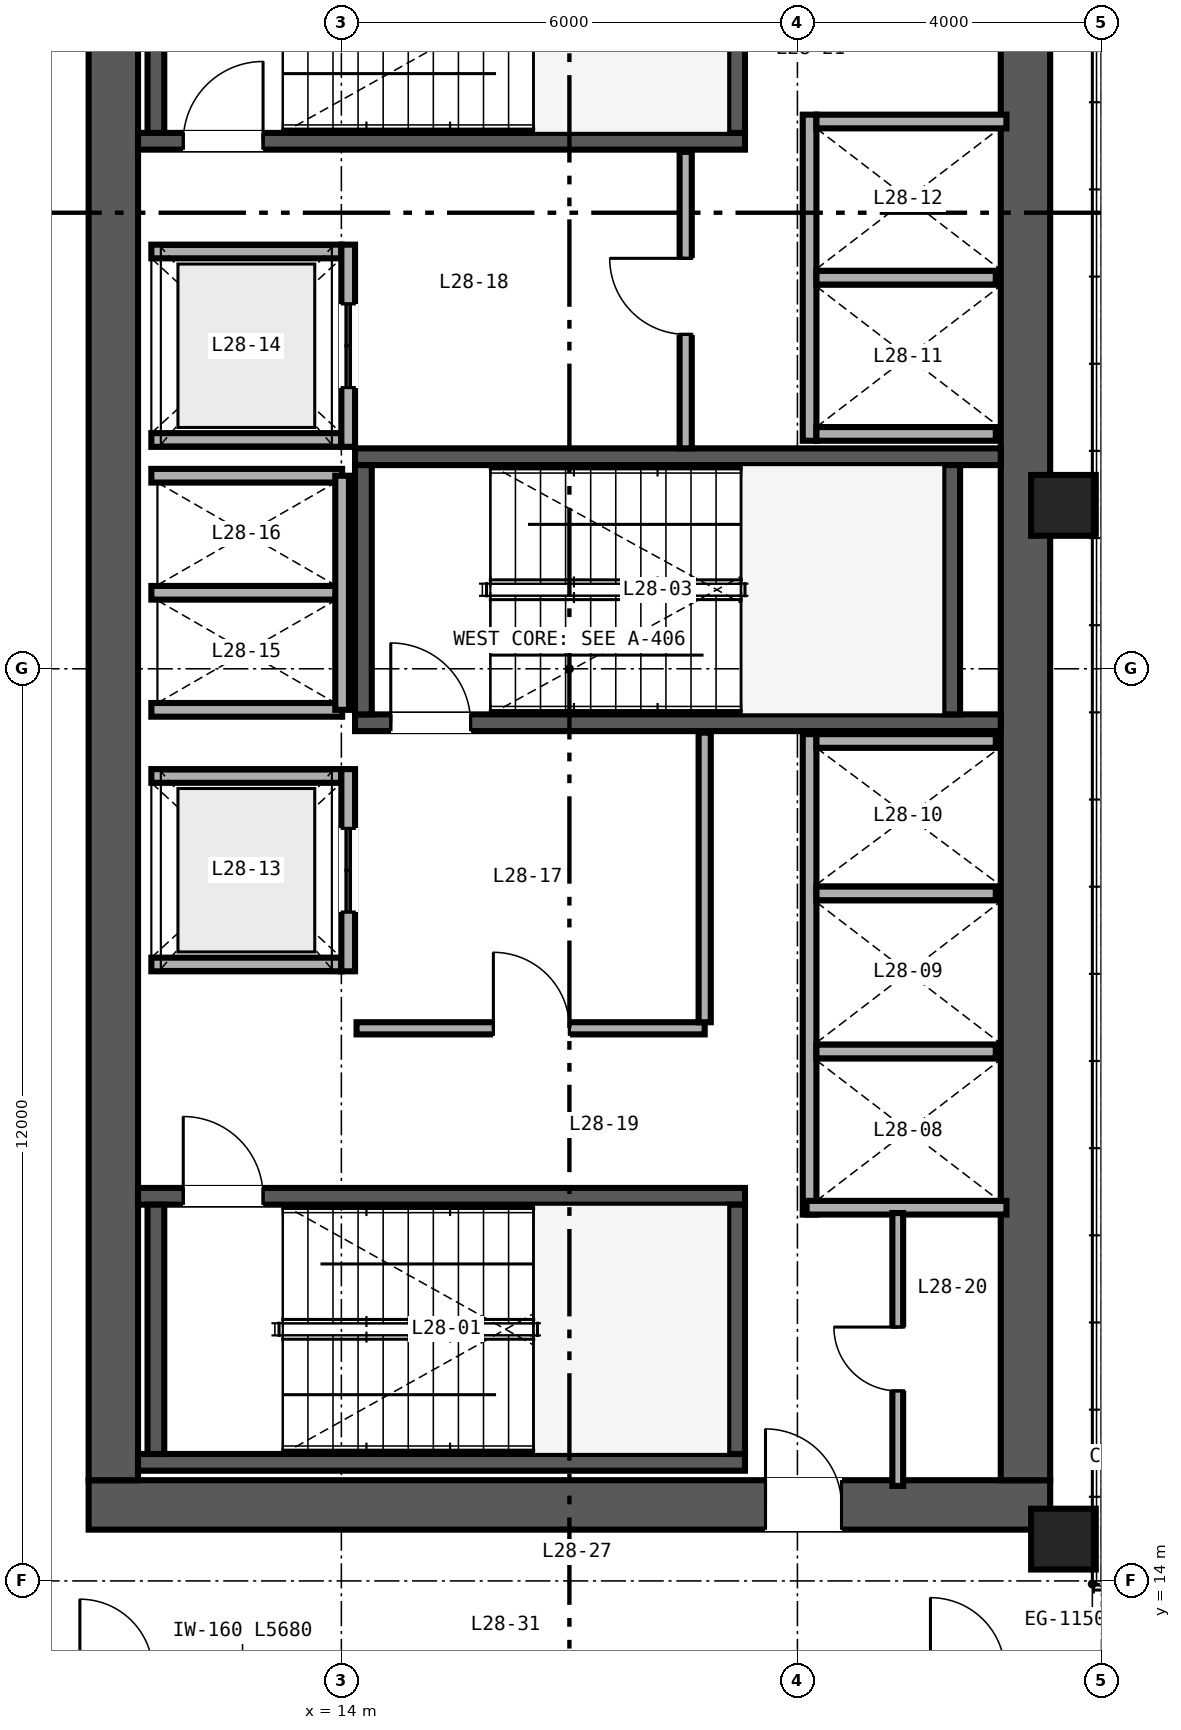
"""IFC4 building model, lengths in metres.
Left out: names, types, materials, properties, quantities, classifications, styles, units other than length and angle.
Written with IfcOpenShell. Run it as: python <this file> out.ifc"""

import sys

from ifc_helpers import new_model, si_unit, direction, frame, frame_2d, origin, origin_2d, place, context, subcontext, project, spatial, rectangle, hollow_rectangle, extrude, source, transform, mapped, element, fill, save


model = new_model("IFC4")
c1 = context("Model", 3, precision=1e-05, world=origin(), true_north=direction((0.0, 1.0)))
c2 = subcontext(c1, "Body", "Model", "MODEL_VIEW")
j1 = project(units=[si_unit("LENGTHUNIT", "METRE"), si_unit("PLANEANGLEUNIT", "RADIAN")], contexts=[c1])
p1 = place(None, origin())
s1 = spatial("IfcSite", under=j1, at=p1, CompositionType="ELEMENT")
p2 = place(p1, origin())
s2 = spatial("IfcBuilding", under=s1, at=p2, CompositionType="ELEMENT")
p3 = place(p2, frame((0.0, 0.0, 115.2)))
s3 = spatial("IfcBuildingStorey", under=s2, at=p3, CompositionType="ELEMENT", Elevation=115.2)
p4 = place(p3, frame((10.675, 15.0, 0.0), z_axis=(0.0, 0.0, 1.0), x_axis=(1.0, 0.0, 0.0)))
e1 = element("IfcWall", 1, at=p4, inside=s3, PredefinedType="SHEAR", context=c2, shape_type="SweptSolid", body=[
    extrude(rectangle(XDim=12.65, YDim=0.65, at=frame_2d((6.325, 0.0))), origin(), (0.0, 0.0, 1.0), 3.36),
])
p5 = place(p4, frame((8.905, 0.0, 0.0)))
e2 = element("IfcOpeningElement", 2, at=p5, cuts=e1, PredefinedType="OPENING", context=c2, shape_type="SweptSolid", body=[
    extrude(rectangle(XDim=1.0, YDim=2.15, at=frame_2d((0.5, 1.075))), frame((0.0, 0.335, 0.0), z_axis=(0.0, -1.0, 0.0), x_axis=(1.0, 0.0, 0.0)), (0.0, 0.0, 1.0), 0.67),
])
for number, where, z_axis, x_axis in (
    (3, (11.0, 15.325, 0.0), (0.0, 0.0, 1.0), (0.0, 1.0, 0.0)),
    (4, (23.0, 15.325, 0.0), (0.0, 0.0, 1.0), (0.0, 1.0, 0.0)),
):
    element("IfcWall", number, at=place(p3, frame(where, z_axis=z_axis, x_axis=x_axis)), inside=s3, PredefinedType="SHEAR", context=c2, shape_type="SweptSolid", body=[
        extrude(rectangle(XDim=21.35, YDim=0.65, at=frame_2d((10.675, 0.0))), origin(), (0.0, 0.0, 1.0), 3.36),
    ])
p6 = place(p3, frame((11.325, 15.56, 0.0), z_axis=(0.0, 0.0, 1.0), x_axis=(1.0, 0.0, 0.0)))
e5 = element("IfcWall", 5, at=p6, inside=s3, PredefinedType="SHEAR", context=c2, shape_type="SweptSolid", body=[
    extrude(rectangle(XDim=7.985, YDim=0.22, at=frame_2d((3.993, 0.0))), origin(), (0.0, 0.0, 1.0), 3.4),
])
p7 = place(p3, frame((11.325, 19.06, 0.0), z_axis=(0.0, 0.0, 1.0), x_axis=(1.0, 0.0, 0.0)))
e6 = element("IfcWall", 6, at=p7, inside=s3, PredefinedType="SHEAR", context=c2, shape_type="SweptSolid", body=[
    extrude(rectangle(XDim=7.985, YDim=0.22, at=frame_2d((3.993, 0.0))), origin(), (0.0, 0.0, 1.0), 3.4),
])
p8 = place(p7, frame((0.595, 0.0, 0.0)))
e7 = element("IfcOpeningElement", 7, at=p8, cuts=e6, PredefinedType="OPENING", context=c2, shape_type="SweptSolid", body=[
    extrude(rectangle(XDim=1.05, YDim=2.15, at=frame_2d((0.525, 1.075))), frame((0.0, 0.12, 0.0), z_axis=(0.0, -1.0, 0.0), x_axis=(1.0, 0.0, 0.0)), (0.0, 0.0, 1.0), 0.24),
])
for number, where, z_axis, x_axis in (
    (8, (11.56, 15.67, 0.0), (0.0, 0.0, 1.0), (0.0, 1.0, 0.0)),
    (9, (19.2, 15.67, 0.0), (0.0, 0.0, 1.0), (0.0, 1.0, 0.0)),
):
    element("IfcWall", number, at=place(p3, frame(where, z_axis=z_axis, x_axis=x_axis)), inside=s3, PredefinedType="SHEAR", context=c2, shape_type="SweptSolid", body=[
        extrude(rectangle(XDim=3.28, YDim=0.22, at=frame_2d((1.64, 0.0))), origin(), (0.0, 0.0, 1.0), 3.4),
    ])
p9 = place(p3, frame((11.325, 32.94, 0.0), z_axis=(0.0, 0.0, 1.0), x_axis=(1.0, 0.0, 0.0)))
e10 = element("IfcWall", 10, at=p9, inside=s3, PredefinedType="SHEAR", context=c2, shape_type="SweptSolid", body=[
    extrude(rectangle(XDim=7.985, YDim=0.22, at=frame_2d((3.993, 0.0))), origin(), (0.0, 0.0, 1.0), 3.4),
])
p10 = place(p9, frame((0.595, 0.0, 0.0)))
e11 = element("IfcOpeningElement", 11, at=p10, cuts=e10, PredefinedType="OPENING", context=c2, shape_type="SweptSolid", body=[
    extrude(rectangle(XDim=1.05, YDim=2.15, at=frame_2d((0.525, 1.075))), frame((0.0, 0.12, 0.0), z_axis=(0.0, -1.0, 0.0), x_axis=(1.0, 0.0, 0.0)), (0.0, 0.0, 1.0), 0.24),
])
for number, where, z_axis, x_axis in (
    (12, (11.56, 33.05, 0.0), (0.0, 0.0, 1.0), (0.0, 1.0, 0.0)),
    (13, (19.2, 33.05, 0.0), (0.0, 0.0, 1.0), (0.0, 1.0, 0.0)),
):
    element("IfcWall", number, at=place(p3, frame(where, z_axis=z_axis, x_axis=x_axis)), inside=s3, PredefinedType="SHEAR", context=c2, shape_type="SweptSolid", body=[
        extrude(rectangle(XDim=3.28, YDim=0.22, at=frame_2d((1.64, 0.0))), origin(), (0.0, 0.0, 1.0), 3.4),
    ])
p11 = place(p3, frame((14.18, 25.29, 0.0), z_axis=(0.0, 0.0, 1.0), x_axis=(1.0, 0.0, 0.0)))
e14 = element("IfcWall", 14, at=p11, inside=s3, PredefinedType="SHEAR", context=c2, shape_type="SweptSolid", body=[
    extrude(rectangle(XDim=8.495, YDim=0.22, at=frame_2d((4.248, 0.0))), origin(), (0.0, 0.0, 1.0), 3.4),
])
p12 = place(p11, frame((0.47, 0.0, 0.0)))
e15 = element("IfcOpeningElement", 15, at=p12, cuts=e14, PredefinedType="OPENING", context=c2, shape_type="SweptSolid", body=[
    extrude(rectangle(XDim=1.05, YDim=2.15, at=frame_2d((0.525, 1.075))), frame((0.0, 0.12, 0.0), z_axis=(0.0, -1.0, 0.0), x_axis=(1.0, 0.0, 0.0)), (0.0, 0.0, 1.0), 0.24),
])
p13 = place(p3, frame((14.18, 28.79, 0.0), z_axis=(0.0, 0.0, 1.0), x_axis=(1.0, 0.0, 0.0)))
e16 = element("IfcWall", 16, at=p13, inside=s3, PredefinedType="SHEAR", context=c2, shape_type="SweptSolid", body=[
    extrude(rectangle(XDim=8.495, YDim=0.22, at=frame_2d((4.248, 0.0))), origin(), (0.0, 0.0, 1.0), 3.4),
])
for number, where, z_axis, x_axis in (
    (17, (14.29, 25.4, 0.0), (0.0, 0.0, 1.0), (0.0, 1.0, 0.0)),
    (18, (22.03, 25.4, 0.0), (0.0, 0.0, 1.0), (0.0, 1.0, 0.0)),
):
    element("IfcWall", number, at=place(p3, frame(where, z_axis=z_axis, x_axis=x_axis)), inside=s3, PredefinedType="SHEAR", context=c2, shape_type="SweptSolid", body=[
        extrude(rectangle(XDim=3.28, YDim=0.22, at=frame_2d((1.64, 0.0))), origin(), (0.0, 0.0, 1.0), 3.4),
    ])
m1 = source(origin(), c2, "Body", "SweptSolid", [
    extrude(hollow_rectangle(XDim=0.85, YDim=0.8, WallThickness=0.032, at=origin_2d()), origin(), (0.0, 0.0, 1.0), 3.36),
])
for number, where, z_axis, x_axis in (
    (19, (23.5, 14.55, 0.0), (0.0, 0.0, 1.0), (1.0, 0.0, 0.0)),
    (20, (23.5, 28.15, 0.0), (0.0, 0.0, 1.0), (1.0, 0.0, 0.0)),
):
    element("IfcColumn", number, at=place(p3, frame(where, z_axis=z_axis, x_axis=x_axis)), inside=s3, PredefinedType="COLUMN", context=c2, shape_type="MappedRepresentation", body=[
        mapped(m1, transform((0.0, 0.0, 0.0), scale=1.0)),
    ])
p14 = place(p3, frame((20.16, 18.82, 0.0), z_axis=(0.0, 0.0, 1.0), x_axis=(0.0, 1.0, 0.0)))
e21 = element("IfcWall", 21, at=p14, inside=s3, PredefinedType="SOLIDWALL", context=c2, shape_type="SweptSolid", body=[
    extrude(rectangle(XDim=6.32, YDim=0.18, at=frame_2d((3.16, 0.0))), origin(), (0.0, 0.0, 1.0), 2.36),
])
p15 = place(p3, frame((20.12, 18.91, 0.0), z_axis=(0.0, 0.0, 1.0), x_axis=(1.0, 0.0, 0.0)))
e22 = element("IfcWall", 22, at=p15, inside=s3, PredefinedType="SOLIDWALL", context=c2, shape_type="SweptSolid", body=[
    extrude(rectangle(XDim=2.63, YDim=0.18, at=frame_2d((1.315, 0.0))), origin(), (0.0, 0.0, 1.0), 3.36),
])
p16 = place(p3, frame((20.25, 25.05, 0.0), z_axis=(0.0, 0.0, 1.0), x_axis=(1.0, 0.0, 0.0)))
e23 = element("IfcWall", 23, at=p16, inside=s3, PredefinedType="SOLIDWALL", context=c2, shape_type="SweptSolid", body=[
    extrude(rectangle(XDim=2.36, YDim=0.18, at=frame_2d((1.18, 0.0))), origin(), (0.0, 0.0, 1.0), 3.36),
])
p17 = place(p3, frame((20.25, 20.965, 0.0), z_axis=(0.0, 0.0, 1.0), x_axis=(1.0, 0.0, 0.0)))
e24 = element("IfcWall", 24, at=p17, inside=s3, PredefinedType="SOLIDWALL", context=c2, shape_type="SweptSolid", body=[
    extrude(rectangle(XDim=2.36, YDim=0.18, at=frame_2d((1.18, 0.0))), origin(), (0.0, 0.0, 1.0), 2.36),
])
p18 = place(p3, frame((20.25, 23.045, 0.0), z_axis=(0.0, 0.0, 1.0), x_axis=(1.0, 0.0, 0.0)))
e25 = element("IfcWall", 25, at=p18, inside=s3, PredefinedType="SOLIDWALL", context=c2, shape_type="SweptSolid", body=[
    extrude(rectangle(XDim=2.36, YDim=0.18, at=frame_2d((1.18, 0.0))), origin(), (0.0, 0.0, 1.0), 3.36),
])
p19 = place(p3, frame((20.16, 29.0, 0.0), z_axis=(0.0, 0.0, 1.0), x_axis=(0.0, 1.0, 0.0)))
e26 = element("IfcWall", 26, at=p19, inside=s3, PredefinedType="SOLIDWALL", context=c2, shape_type="SweptSolid", body=[
    extrude(rectangle(XDim=4.29, YDim=0.18, at=frame_2d((2.145, 0.0))), origin(), (0.0, 0.0, 1.0), 3.36),
])
p20 = place(p3, frame((20.25, 29.09, 0.0), z_axis=(0.0, 0.0, 1.0), x_axis=(1.0, 0.0, 0.0)))
e27 = element("IfcWall", 27, at=p20, inside=s3, PredefinedType="SOLIDWALL", context=c2, shape_type="SweptSolid", body=[
    extrude(rectangle(XDim=2.36, YDim=0.18, at=frame_2d((1.18, 0.0))), origin(), (0.0, 0.0, 1.0), 3.36),
])
p21 = place(p3, frame((20.25, 33.2, 0.0), z_axis=(0.0, 0.0, 1.0), x_axis=(1.0, 0.0, 0.0)))
e28 = element("IfcWall", 28, at=p21, inside=s3, PredefinedType="SOLIDWALL", context=c2, shape_type="SweptSolid", body=[
    extrude(rectangle(XDim=2.5, YDim=0.18, at=frame_2d((1.25, 0.0))), origin(), (0.0, 0.0, 1.0), 3.36),
])
p22 = place(p3, frame((20.25, 31.145, 0.0), z_axis=(0.0, 0.0, 1.0), x_axis=(1.0, 0.0, 0.0)))
e29 = element("IfcWall", 29, at=p22, inside=s3, PredefinedType="SOLIDWALL", context=c2, shape_type="SweptSolid", body=[
    extrude(rectangle(XDim=2.36, YDim=0.18, at=frame_2d((1.18, 0.0))), origin(), (0.0, 0.0, 1.0), 3.36),
])
for number, where, z_axis, x_axis in (
    (30, (11.5, 22.11, 0.0), (0.0, 0.0, 1.0), (1.0, 0.0, 0.0)),
    (31, (11.5, 24.59, 0.0), (0.0, 0.0, 1.0), (1.0, 0.0, 0.0)),
):
    element("IfcWall", number, at=place(p3, frame(where, z_axis=z_axis, x_axis=x_axis)), inside=s3, PredefinedType="SOLIDWALL", context=c2, shape_type="SweptSolid", body=[
        extrude(rectangle(XDim=2.5, YDim=0.18, at=frame_2d((1.25, 0.0))), origin(), (0.0, 0.0, 1.0), 3.36),
    ])
p23 = place(p3, frame((14.09, 22.02, 0.0), z_axis=(0.0, 0.0, 1.0), x_axis=(0.0, 1.0, 0.0)))
e32 = element("IfcWall", 32, at=p23, inside=s3, PredefinedType="SOLIDWALL", context=c2, shape_type="SweptSolid", body=[
    extrude(rectangle(XDim=2.66, YDim=0.18, at=frame_2d((1.33, 0.0))), origin(), (0.0, 0.0, 1.0), 3.36),
])
p24 = place(p23, frame((0.78, 0.0, 0.0)))
e33 = element("IfcOpeningElement", 33, at=p24, cuts=e32, PredefinedType="OPENING", context=c2, shape_type="SweptSolid", body=[
    extrude(rectangle(XDim=1.1, YDim=2.2, at=frame_2d((0.55, 1.1))), frame((0.0, 0.1, 0.0), z_axis=(0.0, -1.0, 0.0), x_axis=(1.0, 0.0, 0.0)), (0.0, 0.0, 1.0), 0.2),
])
for number, where, z_axis, x_axis in (
    (34, (11.5, 29.01, 0.0), (0.0, 0.0, 1.0), (1.0, 0.0, 0.0)),
    (35, (11.5, 31.49, 0.0), (0.0, 0.0, 1.0), (1.0, 0.0, 0.0)),
):
    element("IfcWall", number, at=place(p3, frame(where, z_axis=z_axis, x_axis=x_axis)), inside=s3, PredefinedType="SOLIDWALL", context=c2, shape_type="SweptSolid", body=[
        extrude(rectangle(XDim=2.5, YDim=0.18, at=frame_2d((1.25, 0.0))), origin(), (0.0, 0.0, 1.0), 3.36),
    ])
p25 = place(p3, frame((14.09, 28.92, 0.0), z_axis=(0.0, 0.0, 1.0), x_axis=(0.0, 1.0, 0.0)))
e36 = element("IfcWall", 36, at=p25, inside=s3, PredefinedType="SOLIDWALL", context=c2, shape_type="SweptSolid", body=[
    extrude(rectangle(XDim=2.66, YDim=0.18, at=frame_2d((1.33, 0.0))), origin(), (0.0, 0.0, 1.0), 3.36),
])
p26 = place(p25, frame((0.78, 0.0, 0.0)))
e37 = element("IfcOpeningElement", 37, at=p26, cuts=e36, PredefinedType="OPENING", context=c2, shape_type="SweptSolid", body=[
    extrude(rectangle(XDim=1.1, YDim=2.2, at=frame_2d((0.55, 1.1))), frame((0.0, 0.1, 0.0), z_axis=(0.0, -1.0, 0.0), x_axis=(1.0, 0.0, 0.0)), (0.0, 0.0, 1.0), 0.2),
])
for number, where, z_axis, x_axis in (
    (38, (11.5, 25.46, 0.0), (0.0, 0.0, 1.0), (1.0, 0.0, 0.0)),
    (39, (11.5, 27.0, 0.0), (0.0, 0.0, 1.0), (1.0, 0.0, 0.0)),
    (40, (11.5, 28.54, 0.0), (0.0, 0.0, 1.0), (1.0, 0.0, 0.0)),
):
    element("IfcWall", number, at=place(p3, frame(where, z_axis=z_axis, x_axis=x_axis)), inside=s3, PredefinedType="SOLIDWALL", context=c2, shape_type="SweptSolid", body=[
        extrude(rectangle(XDim=2.51, YDim=0.18, at=frame_2d((1.255, 0.0))), origin(), (0.0, 0.0, 1.0), 3.36),
    ])
p27 = place(p3, frame((14.01, 25.46, 0.0), z_axis=(0.0, 0.0, 1.0), x_axis=(0.0, 1.0, 0.0)))
e41 = element("IfcWall", 41, at=p27, inside=s3, PredefinedType="SOLIDWALL", context=c2, shape_type="SweptSolid", body=[
    extrude(rectangle(XDim=3.08, YDim=0.18, at=frame_2d((1.54, 0.0))), origin(), (0.0, 0.0, 1.0), 3.36),
])
p28 = place(p3, frame((14.2, 21.27, 0.0), z_axis=(0.0, 0.0, 1.0), x_axis=(1.0, 0.0, 0.0)))
e42 = element("IfcWall", 42, at=p28, inside=s3, PredefinedType="PARTITIONING", context=c2, shape_type="SweptSolid", body=[
    extrude(rectangle(XDim=4.58, YDim=0.16, at=frame_2d((2.29, 0.0))), origin(), (0.0, 0.0, 1.0), 3.36),
])
p29 = place(p28, frame((1.8, 0.0, 0.0)))
e43 = element("IfcOpeningElement", 43, at=p29, cuts=e42, PredefinedType="OPENING", context=c2, shape_type="SweptSolid", body=[
    extrude(rectangle(XDim=1.0, YDim=2.15, at=frame_2d((0.5, 1.075))), frame((0.0, 0.09, 0.0), z_axis=(0.0, -1.0, 0.0), x_axis=(1.0, 0.0, 0.0)), (0.0, 0.0, 1.0), 0.18),
])
p30 = place(p3, frame((18.78, 21.35, 0.0), z_axis=(0.0, 0.0, 1.0), x_axis=(0.0, 1.0, 0.0)))
e44 = element("IfcWall", 44, at=p30, inside=s3, PredefinedType="PARTITIONING", context=c2, shape_type="SweptSolid", body=[
    extrude(rectangle(XDim=3.81, YDim=0.16, at=frame_2d((1.905, 0.0))), origin(), (0.0, 0.0, 1.0), 3.36),
])
p31 = place(p3, frame((18.53, 28.9, 0.0), z_axis=(0.0, 0.0, 1.0), x_axis=(0.0, 1.0, 0.0)))
e45 = element("IfcWall", 45, at=p31, inside=s3, PredefinedType="PARTITIONING", context=c2, shape_type="SweptSolid", body=[
    extrude(rectangle(XDim=3.9, YDim=0.16, at=frame_2d((1.95, 0.0))), origin(), (0.0, 0.0, 1.0), 3.36),
])
p32 = place(p31, frame((1.5, 0.0, 0.0)))
e46 = element("IfcOpeningElement", 46, at=p32, cuts=e45, PredefinedType="OPENING", context=c2, shape_type="SweptSolid", body=[
    extrude(rectangle(XDim=1.0, YDim=2.15, at=frame_2d((0.5, 1.075))), frame((0.0, 0.09, 0.0), z_axis=(0.0, -1.0, 0.0), x_axis=(1.0, 0.0, 0.0)), (0.0, 0.0, 1.0), 0.18),
])
p33 = place(p3, frame((21.32, 15.25, 0.0), z_axis=(0.0, 0.0, 1.0), x_axis=(0.0, 1.0, 0.0)))
e47 = element("IfcWall", 47, at=p33, inside=s3, PredefinedType="PARTITIONING", context=c2, shape_type="SweptSolid", body=[
    extrude(rectangle(XDim=3.59, YDim=0.142, at=frame_2d((1.795, 0.0))), origin(), (0.0, 0.0, 1.0), 3.36),
])
p34 = place(p33, frame((1.25, 0.0, 0.0)))
e48 = element("IfcOpeningElement", 48, at=p34, cuts=e47, PredefinedType="OPENING", context=c2, shape_type="SweptSolid", body=[
    extrude(rectangle(XDim=0.84, YDim=2.1, at=frame_2d((0.42, 1.05))), frame((0.0, 0.081, 0.0), z_axis=(0.0, -1.0, 0.0), x_axis=(1.0, 0.0, 0.0)), (0.0, 0.0, 1.0), 0.162),
])
m2 = source(origin(), c2, "Body", "SweptSolid", [
    extrude(rectangle(XDim=1.05, YDim=2.15, at=frame_2d((0.525, 1.075))), frame((0.0, 0.025, 0.0), z_axis=(0.0, -1.0, 0.0), x_axis=(1.0, 0.0, 0.0)), (0.0, 0.0, 1.0), 0.05),
])
p35 = place(p8, origin())
e49 = element("IfcDoor", 49, at=p35, inside=s3, OperationType="SINGLE_SWING_LEFT", PredefinedType="DOOR", context=c2, shape_type="MappedRepresentation", body=[
    mapped(m2, transform((0.0, 0.0, 0.0), scale=1.0)),
])
fill(e7, e49)
p36 = place(p10, origin())
e50 = element("IfcDoor", 50, at=p36, inside=s3, OperationType="SINGLE_SWING_RIGHT", PredefinedType="DOOR", context=c2, shape_type="MappedRepresentation", body=[
    mapped(m2, transform((0.0, 0.0, 0.0), scale=1.0)),
])
fill(e11, e50)
p37 = place(p12, origin())
e51 = element("IfcDoor", 51, at=p37, inside=s3, OperationType="SINGLE_SWING_LEFT", PredefinedType="DOOR", context=c2, shape_type="MappedRepresentation", body=[
    mapped(m2, transform((0.0, 0.0, 0.0), scale=1.0)),
])
fill(e15, e51)
m3 = source(origin(), c2, "Body", "SweptSolid", [
    extrude(rectangle(XDim=1.1, YDim=2.2, at=frame_2d((0.55, 1.1))), frame((0.0, 0.025, 0.0), z_axis=(0.0, -1.0, 0.0), x_axis=(1.0, 0.0, 0.0)), (0.0, 0.0, 1.0), 0.05),
])
p38 = place(p24, origin())
e52 = element("IfcDoor", 52, at=p38, inside=s3, OperationType="DOUBLE_DOOR_SLIDING", PredefinedType="DOOR", context=c2, shape_type="MappedRepresentation", body=[
    mapped(m3, transform((0.0, 0.0, 0.0), scale=1.0)),
])
fill(e33, e52)
p39 = place(p26, origin())
e53 = element("IfcDoor", 53, at=p39, inside=s3, OperationType="DOUBLE_DOOR_SLIDING", PredefinedType="DOOR", context=c2, shape_type="MappedRepresentation", body=[
    mapped(m3, transform((0.0, 0.0, 0.0), scale=1.0)),
])
fill(e37, e53)
m4 = source(origin(), c2, "Body", "SweptSolid", [
    extrude(rectangle(XDim=1.0, YDim=2.15, at=frame_2d((0.5, 1.075))), frame((0.0, 0.025, 0.0), z_axis=(0.0, -1.0, 0.0), x_axis=(1.0, 0.0, 0.0)), (0.0, 0.0, 1.0), 0.05),
])
p40 = place(p29, origin())
e54 = element("IfcDoor", 54, at=p40, inside=s3, OperationType="SINGLE_SWING_LEFT", PredefinedType="DOOR", context=c2, shape_type="MappedRepresentation", body=[
    mapped(m4, transform((0.0, 0.0, 0.0), scale=1.0)),
])
fill(e43, e54)
p41 = place(p32, origin())
e55 = element("IfcDoor", 55, at=p41, inside=s3, OperationType="SINGLE_SWING_RIGHT", PredefinedType="DOOR", context=c2, shape_type="MappedRepresentation", body=[
    mapped(m4, transform((0.0, 0.0, 0.0), scale=1.0)),
])
fill(e46, e55)
m5 = source(origin(), c2, "Body", "SweptSolid", [
    extrude(rectangle(XDim=0.84, YDim=2.1, at=frame_2d((0.42, 1.05))), frame((0.0, 0.025, 0.0), z_axis=(0.0, -1.0, 0.0), x_axis=(1.0, 0.0, 0.0)), (0.0, 0.0, 1.0), 0.05),
])
p42 = place(p34, origin())
e56 = element("IfcDoor", 56, at=p42, inside=s3, OperationType="SINGLE_SWING_RIGHT", PredefinedType="DOOR", context=c2, shape_type="MappedRepresentation", body=[
    mapped(m5, transform((0.0, 0.0, 0.0), scale=1.0)),
])
fill(e48, e56)
p43 = place(p5, origin())
e57 = element("IfcDoor", 57, at=p43, inside=s3, OperationType="SINGLE_SWING_LEFT", PredefinedType="DOOR", context=c2, shape_type="MappedRepresentation", body=[
    mapped(m4, transform((0.0, 0.0, 0.0), scale=1.0)),
])
fill(e2, e57)
save(model, sys.argv[1])
